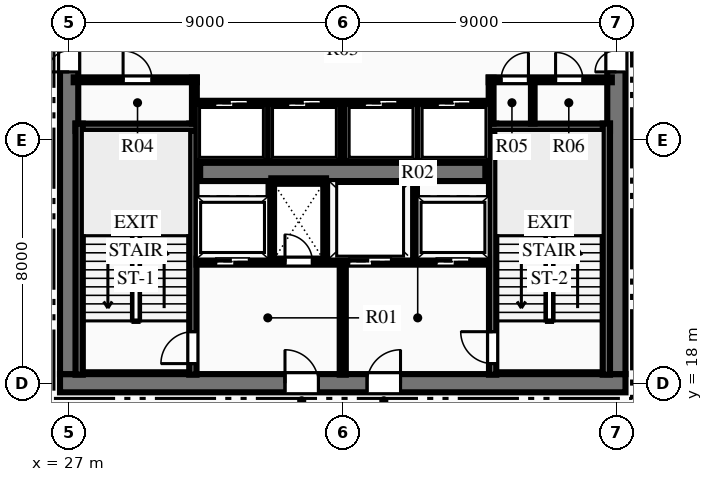
"""IFC4 building model, lengths in metres.
Left out: names, types, materials, properties, quantities, classifications, styles, units other than length and angle.
Written with IfcOpenShell. Run it as: python <this file> out.ifc"""

import sys

from ifc_helpers import new_model, si_unit, direction, frame, frame_2d, origin, place, context, subcontext, project, spatial, rectangle, extrude, element, fill, save


model = new_model("IFC4")
c1 = context("Model", 3, precision=1e-05, world=origin(), true_north=direction((0.0, 1.0)))
c2 = subcontext(c1, "Body", "Model", "MODEL_VIEW")
j1 = project(units=[si_unit("LENGTHUNIT", "METRE"), si_unit("PLANEANGLEUNIT", "RADIAN")], contexts=[c1])
p1 = place(None, origin())
s1 = spatial("IfcSite", under=j1, at=p1, CompositionType="ELEMENT")
p2 = place(p1, origin())
s2 = spatial("IfcBuilding", under=s1, at=p2, CompositionType="ELEMENT")
p3 = place(p2, frame((0.0, 0.0, 32.7)))
s3 = spatial("IfcBuildingStorey", under=s2, at=p3, CompositionType="ELEMENT", Elevation=32.7)
p4 = place(p3, frame((26.7, 18.0, 0.0), z_axis=(0.0, 0.0, 1.0), x_axis=(1.0, 0.0, 0.0)))
e1 = element("IfcWall", 1, at=p4, inside=s3, PredefinedType="SHEAR", context=c2, shape_type="SweptSolid", body=[
    extrude(rectangle(XDim=18.6, YDim=0.6, at=frame_2d((9.3, 0.0))), origin(), (0.0, 0.0, 1.0), 3.75),
])
p5 = place(p4, frame((7.4, 0.0, 0.0)))
e2 = element("IfcOpeningElement", 2, at=p5, cuts=e1, PredefinedType="OPENING", context=c2, shape_type="SweptSolid", body=[
    extrude(rectangle(XDim=1.1, YDim=2.15, at=frame_2d((0.55, 1.075))), frame((0.0, 0.31, 0.0), z_axis=(0.0, -1.0, 0.0), x_axis=(1.0, 0.0, 0.0)), (0.0, 0.0, 1.0), 0.62),
])
p6 = place(p4, frame((10.1, 0.0, 0.0)))
e3 = element("IfcOpeningElement", 3, at=p6, cuts=e1, PredefinedType="OPENING", context=c2, shape_type="SweptSolid", body=[
    extrude(rectangle(XDim=1.1, YDim=2.15, at=frame_2d((0.55, 1.075))), frame((0.0, 0.31, 0.0), z_axis=(0.0, -1.0, 0.0), x_axis=(1.0, 0.0, 0.0)), (0.0, 0.0, 1.0), 0.62),
])
p7 = place(p3, frame((27.0, 18.3, 0.0), z_axis=(0.0, 0.0, 1.0), x_axis=(0.0, 1.0, 0.0)))
e4 = element("IfcWall", 4, at=p7, inside=s3, PredefinedType="SHEAR", context=c2, shape_type="SweptSolid", body=[
    extrude(rectangle(XDim=15.4, YDim=0.6, at=frame_2d((7.7, 0.0))), origin(), (0.0, 0.0, 1.0), 3.75),
])
p8 = place(p7, frame((9.94, 0.0, 0.0)))
e5 = element("IfcOpeningElement", 5, at=p8, cuts=e4, PredefinedType="OPENING", context=c2, shape_type="SweptSolid", body=[
    extrude(rectangle(XDim=1.4, YDim=2.2, at=frame_2d((0.7, 1.1))), frame((0.0, 0.31, 0.0), z_axis=(0.0, -1.0, 0.0), x_axis=(1.0, 0.0, 0.0)), (0.0, 0.0, 1.0), 0.62),
])
p9 = place(p3, frame((45.0, 18.3, 0.0), z_axis=(0.0, 0.0, 1.0), x_axis=(0.0, 1.0, 0.0)))
e6 = element("IfcWall", 6, at=p9, inside=s3, PredefinedType="SHEAR", context=c2, shape_type="SweptSolid", body=[
    extrude(rectangle(XDim=15.4, YDim=0.6, at=frame_2d((7.7, 0.0))), origin(), (0.0, 0.0, 1.0), 3.75),
])
p10 = place(p9, frame((9.94, 0.0, 0.0)))
e7 = element("IfcOpeningElement", 7, at=p10, cuts=e6, PredefinedType="OPENING", context=c2, shape_type="SweptSolid", body=[
    extrude(rectangle(XDim=1.4, YDim=2.2, at=frame_2d((0.7, 1.1))), frame((0.0, 0.31, 0.0), z_axis=(0.0, -1.0, 0.0), x_axis=(1.0, 0.0, 0.0)), (0.0, 0.0, 1.0), 0.62),
])
p11 = place(p3, frame((31.31, 24.95, 0.0), z_axis=(0.0, 0.0, 1.0), x_axis=(1.0, 0.0, 0.0)))
e8 = element("IfcWall", 8, at=p11, inside=s3, PredefinedType="SHEAR", context=c2, shape_type="SweptSolid", body=[
    extrude(rectangle(XDim=9.38, YDim=0.6, at=frame_2d((4.69, 0.0))), origin(), (0.0, 0.0, 1.0), 3.75),
])
p12 = place(p3, frame((31.07, 18.28, 0.0), z_axis=(0.0, 0.0, 1.0), x_axis=(0.0, 1.0, 0.0)))
e9 = element("IfcWall", 9, at=p12, inside=s3, PredefinedType="SHEAR", context=c2, shape_type="SweptSolid", body=[
    extrude(rectangle(XDim=8.26, YDim=0.24, at=frame_2d((4.13, 0.0))), origin(), (0.0, 0.0, 1.0), 3.75),
])
p13 = place(p12, frame((0.365, 0.0, 0.0)))
e10 = element("IfcOpeningElement", 10, at=p13, cuts=e9, PredefinedType="OPENING", context=c2, shape_type="SweptSolid", body=[
    extrude(rectangle(XDim=1.05, YDim=2.15, at=frame_2d((0.525, 1.075))), frame((0.0, 0.13, 0.0), z_axis=(0.0, -1.0, 0.0), x_axis=(1.0, 0.0, 0.0)), (0.0, 0.0, 1.0), 0.26),
])
p14 = place(p3, frame((27.21, 26.42, 0.0), z_axis=(0.0, 0.0, 1.0), x_axis=(1.0, 0.0, 0.0)))
e11 = element("IfcWall", 11, at=p14, inside=s3, PredefinedType="SHEAR", context=c2, shape_type="SweptSolid", body=[
    extrude(rectangle(XDim=3.98, YDim=0.24, at=frame_2d((1.99, 0.0))), origin(), (0.0, 0.0, 1.0), 3.75),
])
p15 = place(p3, frame((27.33, 18.28, 0.0), z_axis=(0.0, 0.0, 1.0), x_axis=(0.0, 1.0, 0.0)))
e12 = element("IfcWall", 12, at=p15, inside=s3, PredefinedType="SHEAR", context=c2, shape_type="SweptSolid", body=[
    extrude(rectangle(XDim=8.26, YDim=0.24, at=frame_2d((4.13, 0.0))), origin(), (0.0, 0.0, 1.0), 3.75),
])
p16 = place(p3, frame((40.93, 18.28, 0.0), z_axis=(0.0, 0.0, 1.0), x_axis=(0.0, 1.0, 0.0)))
e13 = element("IfcWall", 13, at=p16, inside=s3, PredefinedType="SHEAR", context=c2, shape_type="SweptSolid", body=[
    extrude(rectangle(XDim=8.26, YDim=0.24, at=frame_2d((4.13, 0.0))), origin(), (0.0, 0.0, 1.0), 3.75),
])
p17 = place(p16, frame((0.365, 0.0, 0.0)))
e14 = element("IfcOpeningElement", 14, at=p17, cuts=e13, PredefinedType="OPENING", context=c2, shape_type="SweptSolid", body=[
    extrude(rectangle(XDim=1.05, YDim=2.15, at=frame_2d((0.525, 1.075))), frame((0.0, 0.13, 0.0), z_axis=(0.0, -1.0, 0.0), x_axis=(1.0, 0.0, 0.0)), (0.0, 0.0, 1.0), 0.26),
])
p18 = place(p3, frame((40.81, 26.42, 0.0), z_axis=(0.0, 0.0, 1.0), x_axis=(1.0, 0.0, 0.0)))
e15 = element("IfcWall", 15, at=p18, inside=s3, PredefinedType="SHEAR", context=c2, shape_type="SweptSolid", body=[
    extrude(rectangle(XDim=3.98, YDim=0.24, at=frame_2d((1.99, 0.0))), origin(), (0.0, 0.0, 1.0), 3.75),
])
p19 = place(p3, frame((44.67, 18.28, 0.0), z_axis=(0.0, 0.0, 1.0), x_axis=(0.0, 1.0, 0.0)))
e16 = element("IfcWall", 16, at=p19, inside=s3, PredefinedType="SHEAR", context=c2, shape_type="SweptSolid", body=[
    extrude(rectangle(XDim=8.26, YDim=0.24, at=frame_2d((4.13, 0.0))), origin(), (0.0, 0.0, 1.0), 3.75),
])
p20 = place(p3, frame((36.0, 18.28, 0.0), z_axis=(0.0, 0.0, 1.0), x_axis=(0.0, 1.0, 0.0)))
e17 = element("IfcWall", 17, at=p20, inside=s3, PredefinedType="PARTITIONING", context=c2, shape_type="SweptSolid", body=[
    extrude(rectangle(XDim=3.77, YDim=0.2, at=frame_2d((1.885, 0.0))), origin(), (0.0, 0.0, 1.0), 3.44),
])
p21 = place(p3, frame((31.19, 22.0, 0.0), z_axis=(0.0, 0.0, 1.0), x_axis=(1.0, 0.0, 0.0)))
e18 = element("IfcWall", 18, at=p21, inside=s3, PredefinedType="PARTITIONING", context=c2, shape_type="SweptSolid", body=[
    extrude(rectangle(XDim=4.69, YDim=0.2, at=frame_2d((2.345, 0.0))), origin(), (0.0, 0.0, 1.0), 3.44),
])
p22 = place(p21, frame((2.91, 0.0, 0.0)))
e19 = element("IfcOpeningElement", 19, at=p22, cuts=e18, PredefinedType="OPENING", context=c2, shape_type="SweptSolid", body=[
    extrude(rectangle(XDim=0.9, YDim=2.15, at=frame_2d((0.45, 1.075))), frame((0.0, 0.11, 0.0), z_axis=(0.0, -1.0, 0.0), x_axis=(1.0, 0.0, 0.0)), (0.0, 0.0, 1.0), 0.22),
])
p23 = place(p21, frame((0.635, 0.0, 0.0)))
e20 = element("IfcOpeningElement", 20, at=p23, cuts=e18, PredefinedType="OPENING", context=c2, shape_type="SweptSolid", body=[
    extrude(rectangle(XDim=1.1, YDim=2.15, at=frame_2d((0.55, 1.075))), frame((0.0, 0.11, 0.0), z_axis=(0.0, -1.0, 0.0), x_axis=(1.0, 0.0, 0.0)), (0.0, 0.0, 1.0), 0.22),
])
p24 = place(p3, frame((36.12, 22.0, 0.0), z_axis=(0.0, 0.0, 1.0), x_axis=(1.0, 0.0, 0.0)))
e21 = element("IfcWall", 21, at=p24, inside=s3, PredefinedType="PARTITIONING", context=c2, shape_type="SweptSolid", body=[
    extrude(rectangle(XDim=4.69, YDim=0.2, at=frame_2d((2.345, 0.0))), origin(), (0.0, 0.0, 1.0), 3.44),
])
p25 = place(p24, frame((2.955, 0.0, 0.0)))
e22 = element("IfcOpeningElement", 22, at=p25, cuts=e21, PredefinedType="OPENING", context=c2, shape_type="SweptSolid", body=[
    extrude(rectangle(XDim=1.1, YDim=2.15, at=frame_2d((0.55, 1.075))), frame((0.0, 0.11, 0.0), z_axis=(0.0, -1.0, 0.0), x_axis=(1.0, 0.0, 0.0)), (0.0, 0.0, 1.0), 0.22),
])
p26 = place(p24, frame((0.08, 0.0, 0.0)))
e23 = element("IfcOpeningElement", 23, at=p26, cuts=e21, PredefinedType="OPENING", context=c2, shape_type="SweptSolid", body=[
    extrude(rectangle(XDim=1.4, YDim=2.2, at=frame_2d((0.7, 1.1))), frame((0.0, 0.11, 0.0), z_axis=(0.0, -1.0, 0.0), x_axis=(1.0, 0.0, 0.0)), (0.0, 0.0, 1.0), 0.22),
])
for number, where, z_axis, x_axis in (
    (24, (33.65, 22.05, 0.0), (0.0, 0.0, 1.0), (0.0, 1.0, 0.0)),
    (25, (35.45, 22.05, 0.0), (0.0, 0.0, 1.0), (0.0, 1.0, 0.0)),
):
    element("IfcWall", number, at=place(p3, frame(where, z_axis=z_axis, x_axis=x_axis)), inside=s3, PredefinedType="PARTITIONING", context=c2, shape_type="SweptSolid", body=[
        extrude(rectangle(XDim=2.6, YDim=0.18, at=frame_2d((1.3, 0.0))), origin(), (0.0, 0.0, 1.0), 3.44),
    ])
p27 = place(p3, frame((33.65, 24.65, 0.0), z_axis=(0.0, 0.0, 1.0), x_axis=(1.0, 0.0, 0.0)))
e26 = element("IfcWall", 26, at=p27, inside=s3, PredefinedType="PARTITIONING", context=c2, shape_type="SweptSolid", body=[
    extrude(rectangle(XDim=1.8, YDim=0.18, at=frame_2d((0.9, 0.0))), origin(), (0.0, 0.0, 1.0), 3.44),
])
p28 = place(p3, frame((38.35, 22.05, 0.0), z_axis=(0.0, 0.0, 1.0), x_axis=(0.0, 1.0, 0.0)))
e27 = element("IfcWall", 27, at=p28, inside=s3, PredefinedType="PARTITIONING", context=c2, shape_type="SweptSolid", body=[
    extrude(rectangle(XDim=2.6, YDim=0.18, at=frame_2d((1.3, 0.0))), origin(), (0.0, 0.0, 1.0), 3.44),
])
p29 = place(p3, frame((27.15, 27.98, 0.0), z_axis=(0.0, 0.0, 1.0), x_axis=(1.0, 0.0, 0.0)))
e28 = element("IfcWall", 28, at=p29, inside=s3, PredefinedType="PARTITIONING", context=c2, shape_type="SweptSolid", body=[
    extrude(rectangle(XDim=4.05, YDim=0.16, at=frame_2d((2.025, 0.0))), origin(), (0.0, 0.0, 1.0), 3.44),
])
p30 = place(p29, frame((1.625, 0.0, 0.0)))
e29 = element("IfcOpeningElement", 29, at=p30, cuts=e28, PredefinedType="OPENING", context=c2, shape_type="SweptSolid", body=[
    extrude(rectangle(XDim=0.95, YDim=2.15, at=frame_2d((0.475, 1.075))), frame((0.0, 0.09, 0.0), z_axis=(0.0, -1.0, 0.0), x_axis=(1.0, 0.0, 0.0)), (0.0, 0.0, 1.0), 0.18),
])
p31 = place(p3, frame((31.12, 26.54, 0.0), z_axis=(0.0, 0.0, 1.0), x_axis=(0.0, 1.0, 0.0)))
e30 = element("IfcWall", 30, at=p31, inside=s3, PredefinedType="PARTITIONING", context=c2, shape_type="SweptSolid", body=[
    extrude(rectangle(XDim=1.51, YDim=0.16, at=frame_2d((0.755, 0.0))), origin(), (0.0, 0.0, 1.0), 3.44),
])
p32 = place(p3, frame((40.8, 27.98, 0.0), z_axis=(0.0, 0.0, 1.0), x_axis=(1.0, 0.0, 0.0)))
e31 = element("IfcWall", 31, at=p32, inside=s3, PredefinedType="PARTITIONING", context=c2, shape_type="SweptSolid", body=[
    extrude(rectangle(XDim=4.05, YDim=0.16, at=frame_2d((2.025, 0.0))), origin(), (0.0, 0.0, 1.0), 3.44),
])
p33 = place(p32, frame((0.407, 0.0, 0.0)))
e32 = element("IfcOpeningElement", 32, at=p33, cuts=e31, PredefinedType="OPENING", context=c2, shape_type="SweptSolid", body=[
    extrude(rectangle(XDim=0.9, YDim=2.15, at=frame_2d((0.45, 1.075))), frame((0.0, 0.09, 0.0), z_axis=(0.0, -1.0, 0.0), x_axis=(1.0, 0.0, 0.0)), (0.0, 0.0, 1.0), 0.18),
])
p34 = place(p32, frame((2.2, 0.0, 0.0)))
e33 = element("IfcOpeningElement", 33, at=p34, cuts=e31, PredefinedType="OPENING", context=c2, shape_type="SweptSolid", body=[
    extrude(rectangle(XDim=0.9, YDim=2.15, at=frame_2d((0.45, 1.075))), frame((0.0, 0.09, 0.0), z_axis=(0.0, -1.0, 0.0), x_axis=(1.0, 0.0, 0.0)), (0.0, 0.0, 1.0), 0.18),
])
p35 = place(p3, frame((40.88, 26.54, 0.0), z_axis=(0.0, 0.0, 1.0), x_axis=(0.0, 1.0, 0.0)))
e34 = element("IfcWall", 34, at=p35, inside=s3, PredefinedType="PARTITIONING", context=c2, shape_type="SweptSolid", body=[
    extrude(rectangle(XDim=1.51, YDim=0.16, at=frame_2d((0.755, 0.0))), origin(), (0.0, 0.0, 1.0), 3.44),
])
p36 = place(p3, frame((42.25, 26.54, 0.0), z_axis=(0.0, 0.0, 1.0), x_axis=(0.0, 1.0, 0.0)))
e35 = element("IfcWall", 35, at=p36, inside=s3, PredefinedType="PARTITIONING", context=c2, shape_type="SweptSolid", body=[
    extrude(rectangle(XDim=1.44, YDim=0.12, at=frame_2d((0.72, 0.0))), origin(), (0.0, 0.0, 1.0), 3.44),
])
p37 = place(p3, frame((31.2, 27.2, 0.0), z_axis=(0.0, 0.0, 1.0), x_axis=(1.0, 0.0, 0.0)))
e36 = element("IfcWall", 36, at=p37, inside=s3, PredefinedType="PARTITIONING", context=c2, shape_type="SweptSolid", body=[
    extrude(rectangle(XDim=9.6, YDim=0.18, at=frame_2d((4.8, 0.0))), origin(), (0.0, 0.0, 1.0), 3.44),
])
p38 = place(p37, frame((0.59, 0.0, 0.0)))
e37 = element("IfcOpeningElement", 37, at=p38, cuts=e36, PredefinedType="OPENING", context=c2, shape_type="SweptSolid", body=[
    extrude(rectangle(XDim=1.1, YDim=2.15, at=frame_2d((0.55, 1.075))), frame((0.0, 0.1, 0.0), z_axis=(0.0, -1.0, 0.0), x_axis=(1.0, 0.0, 0.0)), (0.0, 0.0, 1.0), 0.2),
])
p39 = place(p37, frame((2.99, 0.0, 0.0)))
e38 = element("IfcOpeningElement", 38, at=p39, cuts=e36, PredefinedType="OPENING", context=c2, shape_type="SweptSolid", body=[
    extrude(rectangle(XDim=1.1, YDim=2.15, at=frame_2d((0.55, 1.075))), frame((0.0, 0.1, 0.0), z_axis=(0.0, -1.0, 0.0), x_axis=(1.0, 0.0, 0.0)), (0.0, 0.0, 1.0), 0.2),
])
p40 = place(p37, frame((5.51, 0.0, 0.0)))
e39 = element("IfcOpeningElement", 39, at=p40, cuts=e36, PredefinedType="OPENING", context=c2, shape_type="SweptSolid", body=[
    extrude(rectangle(XDim=1.1, YDim=2.15, at=frame_2d((0.55, 1.075))), frame((0.0, 0.1, 0.0), z_axis=(0.0, -1.0, 0.0), x_axis=(1.0, 0.0, 0.0)), (0.0, 0.0, 1.0), 0.2),
])
p41 = place(p37, frame((7.91, 0.0, 0.0)))
e40 = element("IfcOpeningElement", 40, at=p41, cuts=e36, PredefinedType="OPENING", context=c2, shape_type="SweptSolid", body=[
    extrude(rectangle(XDim=1.1, YDim=2.15, at=frame_2d((0.55, 1.075))), frame((0.0, 0.1, 0.0), z_axis=(0.0, -1.0, 0.0), x_axis=(1.0, 0.0, 0.0)), (0.0, 0.0, 1.0), 0.2),
])
for number, where, z_axis, x_axis in (
    (41, (33.54, 25.3, 0.0), (0.0, 0.0, 1.0), (0.0, 1.0, 0.0)),
    (42, (36.0, 25.3, 0.0), (0.0, 0.0, 1.0), (0.0, 1.0, 0.0)),
    (43, (38.46, 25.3, 0.0), (0.0, 0.0, 1.0), (0.0, 1.0, 0.0)),
):
    element("IfcWall", number, at=place(p3, frame(where, z_axis=z_axis, x_axis=x_axis)), inside=s3, PredefinedType="PARTITIONING", context=c2, shape_type="SweptSolid", body=[
        extrude(rectangle(XDim=1.9, YDim=0.18, at=frame_2d((0.95, 0.0))), origin(), (0.0, 0.0, 1.0), 3.44),
    ])
p42 = place(p30, origin())
e44 = element("IfcDoor", 44, at=p42, inside=s3, OperationType="SINGLE_SWING_LEFT", PredefinedType="DOOR", context=c2, shape_type="SweptSolid", body=[
    extrude(rectangle(XDim=0.95, YDim=2.15, at=frame_2d((0.475, 1.075))), frame((0.0, 0.025, 0.0), z_axis=(0.0, -1.0, 0.0), x_axis=(1.0, 0.0, 0.0)), (0.0, 0.0, 1.0), 0.05),
])
fill(e29, e44)
p43 = place(p33, origin())
e45 = element("IfcDoor", 45, at=p43, inside=s3, OperationType="SINGLE_SWING_RIGHT", PredefinedType="DOOR", context=c2, shape_type="SweptSolid", body=[
    extrude(rectangle(XDim=0.9, YDim=2.15, at=frame_2d((0.45, 1.075))), frame((0.0, 0.025, 0.0), z_axis=(0.0, -1.0, 0.0), x_axis=(1.0, 0.0, 0.0)), (0.0, 0.0, 1.0), 0.05),
])
fill(e32, e45)
p44 = place(p34, origin())
e46 = element("IfcDoor", 46, at=p44, inside=s3, OperationType="SINGLE_SWING_LEFT", PredefinedType="DOOR", context=c2, shape_type="SweptSolid", body=[
    extrude(rectangle(XDim=0.9, YDim=2.15, at=frame_2d((0.45, 1.075))), frame((0.0, 0.025, 0.0), z_axis=(0.0, -1.0, 0.0), x_axis=(1.0, 0.0, 0.0)), (0.0, 0.0, 1.0), 0.05),
])
fill(e33, e46)
p45 = place(p13, origin())
e47 = element("IfcDoor", 47, at=p45, inside=s3, OperationType="SINGLE_SWING_LEFT", PredefinedType="DOOR", context=c2, shape_type="SweptSolid", body=[
    extrude(rectangle(XDim=1.05, YDim=2.15, at=frame_2d((0.525, 1.075))), frame((0.0, 0.025, 0.0), z_axis=(0.0, -1.0, 0.0), x_axis=(1.0, 0.0, 0.0)), (0.0, 0.0, 1.0), 0.05),
])
fill(e10, e47)
p46 = place(p17, origin())
e48 = element("IfcDoor", 48, at=p46, inside=s3, OperationType="SINGLE_SWING_RIGHT", PredefinedType="DOOR", context=c2, shape_type="SweptSolid", body=[
    extrude(rectangle(XDim=1.05, YDim=2.15, at=frame_2d((0.525, 1.075))), frame((0.0, 0.025, 0.0), z_axis=(0.0, -1.0, 0.0), x_axis=(1.0, 0.0, 0.0)), (0.0, 0.0, 1.0), 0.05),
])
fill(e14, e48)
p47 = place(p5, origin())
e49 = element("IfcDoor", 49, at=p47, inside=s3, OperationType="SINGLE_SWING_LEFT", PredefinedType="DOOR", context=c2, shape_type="SweptSolid", body=[
    extrude(rectangle(XDim=1.1, YDim=2.15, at=frame_2d((0.55, 1.075))), frame((0.0, 0.025, 0.0), z_axis=(0.0, -1.0, 0.0), x_axis=(1.0, 0.0, 0.0)), (0.0, 0.0, 1.0), 0.05),
])
fill(e2, e49)
p48 = place(p6, origin())
e50 = element("IfcDoor", 50, at=p48, inside=s3, OperationType="SINGLE_SWING_RIGHT", PredefinedType="DOOR", context=c2, shape_type="SweptSolid", body=[
    extrude(rectangle(XDim=1.1, YDim=2.15, at=frame_2d((0.55, 1.075))), frame((0.0, 0.025, 0.0), z_axis=(0.0, -1.0, 0.0), x_axis=(1.0, 0.0, 0.0)), (0.0, 0.0, 1.0), 0.05),
])
fill(e3, e50)
p49 = place(p22, origin())
e51 = element("IfcDoor", 51, at=p49, inside=s3, OperationType="SINGLE_SWING_LEFT", PredefinedType="DOOR", context=c2, shape_type="SweptSolid", body=[
    extrude(rectangle(XDim=0.9, YDim=2.15, at=frame_2d((0.45, 1.075))), frame((0.0, 0.025, 0.0), z_axis=(0.0, -1.0, 0.0), x_axis=(1.0, 0.0, 0.0)), (0.0, 0.0, 1.0), 0.05),
])
fill(e19, e51)
p50 = place(p8, origin())
e52 = element("IfcDoor", 52, at=p50, inside=s3, OperationType="DOUBLE_DOOR_SINGLE_SWING", PredefinedType="DOOR", context=c2, shape_type="SweptSolid", body=[
    extrude(rectangle(XDim=1.4, YDim=2.2, at=frame_2d((0.7, 1.1))), frame((0.0, 0.025, 0.0), z_axis=(0.0, -1.0, 0.0), x_axis=(1.0, 0.0, 0.0)), (0.0, 0.0, 1.0), 0.05),
])
fill(e5, e52)
p51 = place(p10, origin())
e53 = element("IfcDoor", 53, at=p51, inside=s3, OperationType="DOUBLE_DOOR_SINGLE_SWING", PredefinedType="DOOR", context=c2, shape_type="SweptSolid", body=[
    extrude(rectangle(XDim=1.4, YDim=2.2, at=frame_2d((0.7, 1.1))), frame((0.0, 0.025, 0.0), z_axis=(0.0, -1.0, 0.0), x_axis=(1.0, 0.0, 0.0)), (0.0, 0.0, 1.0), 0.05),
])
fill(e7, e53)
p52 = place(p38, origin())
e54 = element("IfcDoor", 54, at=p52, inside=s3, OperationType="SLIDING_TO_LEFT", PredefinedType="DOOR", context=c2, shape_type="SweptSolid", body=[
    extrude(rectangle(XDim=1.1, YDim=2.15, at=frame_2d((0.55, 1.075))), frame((0.0, 0.025, 0.0), z_axis=(0.0, -1.0, 0.0), x_axis=(1.0, 0.0, 0.0)), (0.0, 0.0, 1.0), 0.05),
])
fill(e37, e54)
p53 = place(p39, origin())
e55 = element("IfcDoor", 55, at=p53, inside=s3, OperationType="SLIDING_TO_LEFT", PredefinedType="DOOR", context=c2, shape_type="SweptSolid", body=[
    extrude(rectangle(XDim=1.1, YDim=2.15, at=frame_2d((0.55, 1.075))), frame((0.0, 0.025, 0.0), z_axis=(0.0, -1.0, 0.0), x_axis=(1.0, 0.0, 0.0)), (0.0, 0.0, 1.0), 0.05),
])
fill(e38, e55)
p54 = place(p40, origin())
e56 = element("IfcDoor", 56, at=p54, inside=s3, OperationType="SLIDING_TO_LEFT", PredefinedType="DOOR", context=c2, shape_type="SweptSolid", body=[
    extrude(rectangle(XDim=1.1, YDim=2.15, at=frame_2d((0.55, 1.075))), frame((0.0, 0.025, 0.0), z_axis=(0.0, -1.0, 0.0), x_axis=(1.0, 0.0, 0.0)), (0.0, 0.0, 1.0), 0.05),
])
fill(e39, e56)
p55 = place(p41, origin())
e57 = element("IfcDoor", 57, at=p55, inside=s3, OperationType="SLIDING_TO_LEFT", PredefinedType="DOOR", context=c2, shape_type="SweptSolid", body=[
    extrude(rectangle(XDim=1.1, YDim=2.15, at=frame_2d((0.55, 1.075))), frame((0.0, 0.025, 0.0), z_axis=(0.0, -1.0, 0.0), x_axis=(1.0, 0.0, 0.0)), (0.0, 0.0, 1.0), 0.05),
])
fill(e40, e57)
p56 = place(p23, origin())
e58 = element("IfcDoor", 58, at=p56, inside=s3, OperationType="SLIDING_TO_LEFT", PredefinedType="DOOR", context=c2, shape_type="SweptSolid", body=[
    extrude(rectangle(XDim=1.1, YDim=2.15, at=frame_2d((0.55, 1.075))), frame((0.0, 0.025, 0.0), z_axis=(0.0, -1.0, 0.0), x_axis=(1.0, 0.0, 0.0)), (0.0, 0.0, 1.0), 0.05),
])
fill(e20, e58)
p57 = place(p25, origin())
e59 = element("IfcDoor", 59, at=p57, inside=s3, OperationType="SLIDING_TO_LEFT", PredefinedType="DOOR", context=c2, shape_type="SweptSolid", body=[
    extrude(rectangle(XDim=1.1, YDim=2.15, at=frame_2d((0.55, 1.075))), frame((0.0, 0.025, 0.0), z_axis=(0.0, -1.0, 0.0), x_axis=(1.0, 0.0, 0.0)), (0.0, 0.0, 1.0), 0.05),
])
fill(e22, e59)
p58 = place(p26, origin())
e60 = element("IfcDoor", 60, at=p58, inside=s3, OperationType="SLIDING_TO_LEFT", PredefinedType="DOOR", context=c2, shape_type="SweptSolid", body=[
    extrude(rectangle(XDim=1.4, YDim=2.2, at=frame_2d((0.7, 1.1))), frame((0.0, 0.025, 0.0), z_axis=(0.0, -1.0, 0.0), x_axis=(1.0, 0.0, 0.0)), (0.0, 0.0, 1.0), 0.05),
])
fill(e23, e60)
save(model, sys.argv[1])
